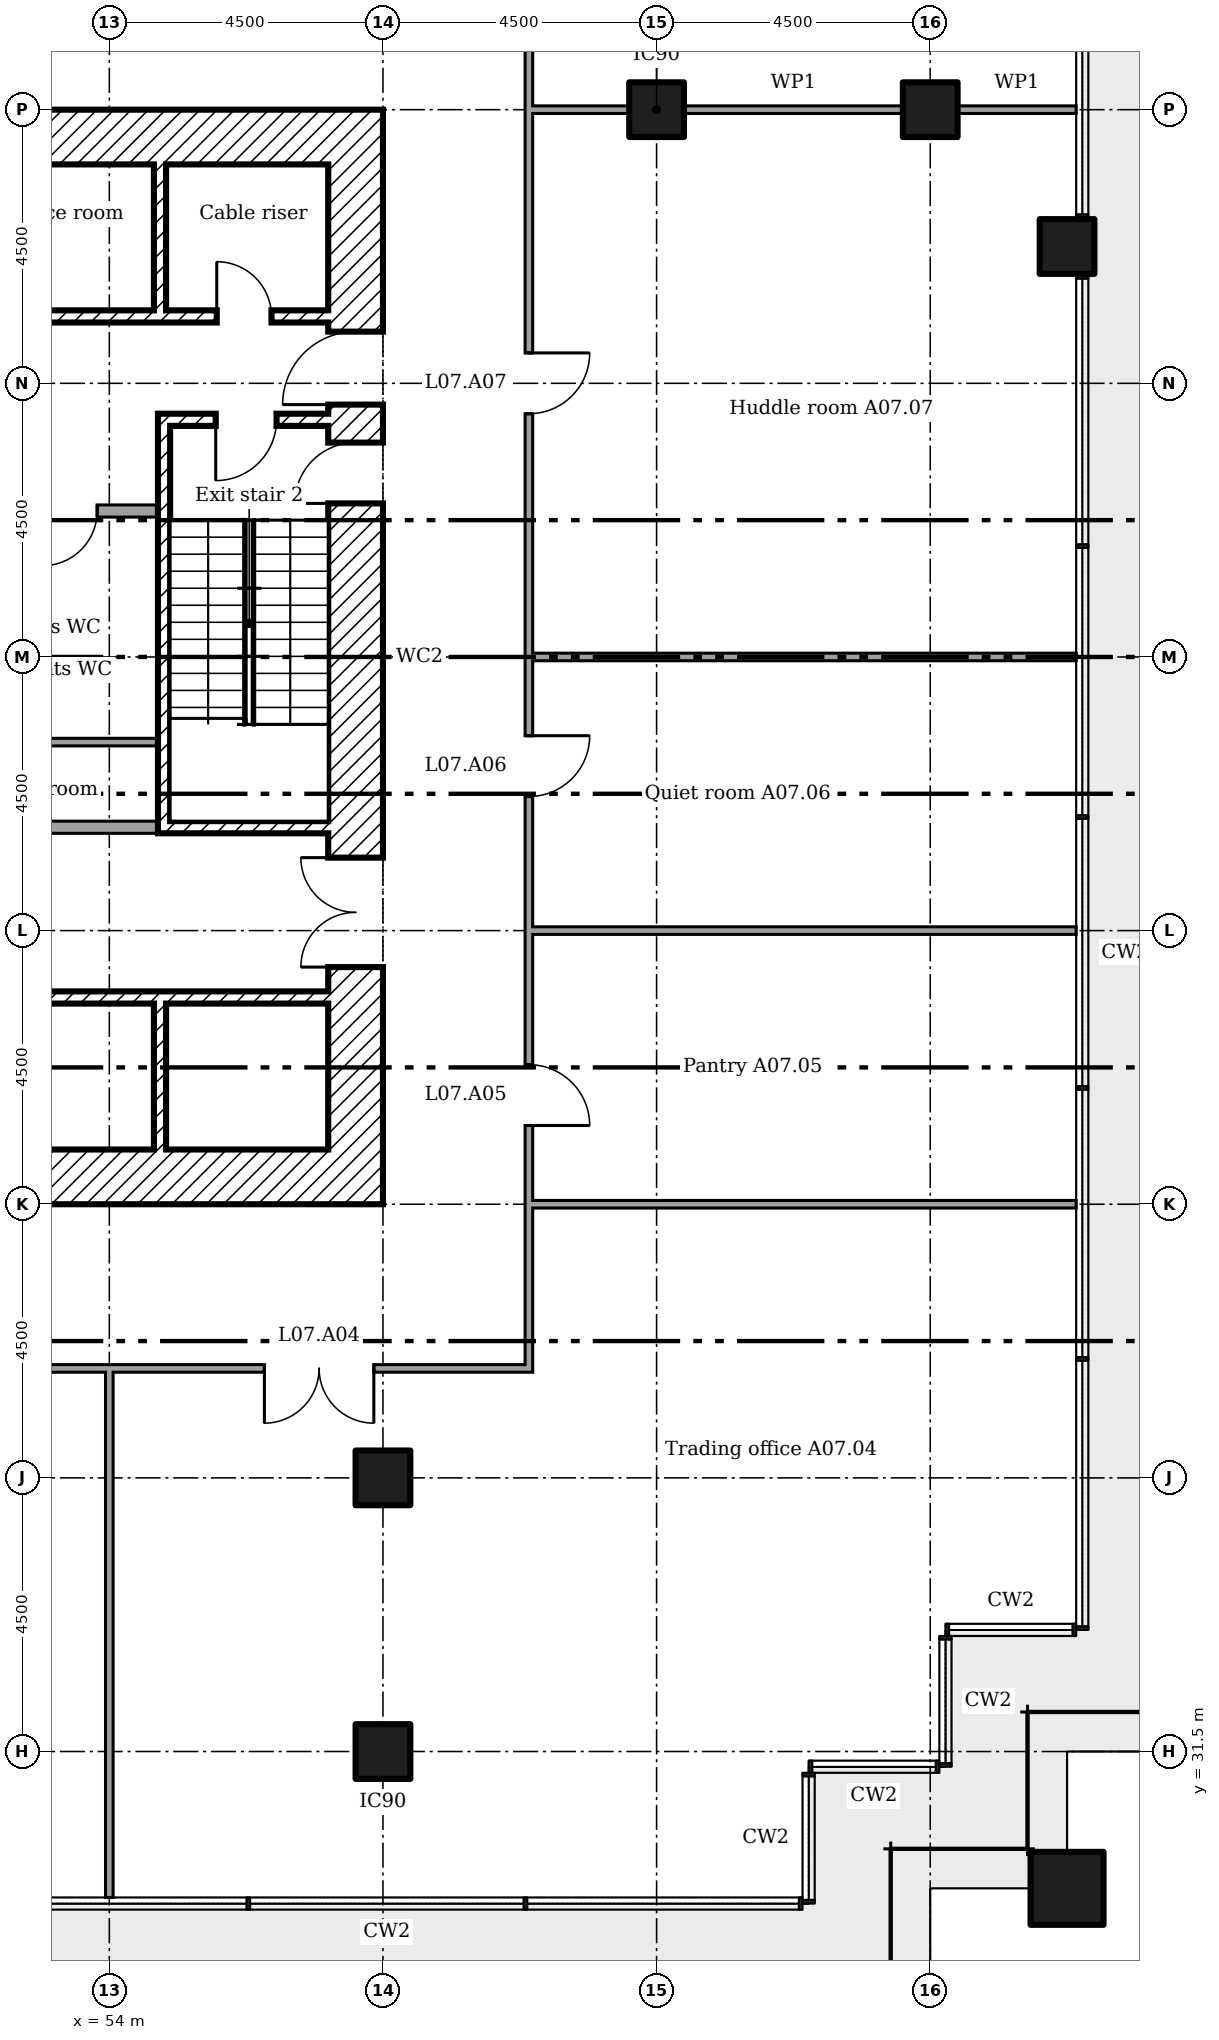
"""IFC4 building model, lengths in metres.
Left out: names, types, materials, properties, quantities, classifications, styles, units other than length and angle.
Written with IfcOpenShell. Run it as: python <this file> out.ifc"""

import sys

from ifc_helpers import new_model, si_unit, direction, frame, frame_2d, origin, origin_2d, place, context, subcontext, project, spatial, rectangle, extrude, element, fill, save


model = new_model("IFC4")
c1 = context("Model", 3, precision=1e-05, world=origin(), true_north=direction((0.0, 1.0)))
c2 = subcontext(c1, "Body", "Model", "MODEL_VIEW")
j1 = project(units=[si_unit("LENGTHUNIT", "METRE"), si_unit("PLANEANGLEUNIT", "RADIAN")], contexts=[c1])
p1 = place(None, origin())
s1 = spatial("IfcSite", under=j1, at=p1, CompositionType="ELEMENT")
p2 = place(p1, origin())
s2 = spatial("IfcBuilding", under=s1, at=p2, CompositionType="ELEMENT")
p3 = place(p2, frame((0.0, 0.0, 34.2)))
s3 = spatial("IfcBuildingStorey", under=s2, at=p3, CompositionType="ELEMENT", Elevation=34.2)
p4 = place(p3, frame((69.75, 29.25, 0.0)))
e1 = element("IfcColumn", 1, at=p4, inside=s3, PredefinedType="COLUMN", context=c2, shape_type="SweptSolid", body=[
    extrude(rectangle(XDim=1.2, YDim=1.2, at=origin_2d()), origin(), (0.0, 0.0, 1.0), 4.4),
])
for number, where in (
    (2, (58.5, 31.5, 0.0)),
    (3, (58.5, 36.0, 0.0)),
    (4, (63.0, 58.5, 0.0)),
    (5, (67.5, 58.5, 0.0)),
    (6, (69.75, 56.25, 0.0)),
):
    element("IfcColumn", number, at=place(p3, frame(where)), inside=s3, PredefinedType="COLUMN", context=c2, shape_type="SweptSolid", body=[
        extrude(rectangle(XDim=0.9, YDim=0.9, at=origin_2d()), origin(), (0.0, 0.0, 1.0), 4.4),
    ])
p5 = place(p3, frame((58.05, 40.5, 0.0), z_axis=(0.0, 0.0, 1.0), x_axis=(0.0, 1.0, 0.0)))
e7 = element("IfcWall", 7, at=p5, inside=s3, PredefinedType="SHEAR", context=c2, shape_type="SweptSolid", body=[
    extrude(rectangle(XDim=18.0, YDim=0.9, at=frame_2d((9.0, 0.0))), origin(), (0.0, 0.0, 1.0), 4.125),
])
p6 = place(p5, frame((13.15, 0.0, 0.0)))
e8 = element("IfcOpeningElement", 8, at=p6, cuts=e7, PredefinedType="OPENING", context=c2, shape_type="SweptSolid", body=[
    extrude(rectangle(XDim=1.2, YDim=2.1, at=frame_2d((0.6, 1.05))), frame((0.0, 0.46, 0.0), z_axis=(0.0, -1.0, 0.0), x_axis=(1.0, 0.0, 0.0)), (0.0, 0.0, 1.0), 0.92),
])
p7 = place(p5, frame((3.9, 0.0, 0.0)))
e9 = element("IfcOpeningElement", 9, at=p7, cuts=e7, PredefinedType="OPENING", context=c2, shape_type="SweptSolid", body=[
    extrude(rectangle(XDim=1.8, YDim=2.1, at=frame_2d((0.9, 1.05))), frame((0.0, 0.46, 0.0), z_axis=(0.0, -1.0, 0.0), x_axis=(1.0, 0.0, 0.0)), (0.0, 0.0, 1.0), 0.92),
])
p8 = place(p5, frame((11.525, 0.0, 0.0)))
e10 = element("IfcOpeningElement", 10, at=p8, cuts=e7, PredefinedType="OPENING", context=c2, shape_type="SweptSolid", body=[
    extrude(rectangle(XDim=1.0, YDim=2.1, at=frame_2d((0.5, 1.05))), frame((0.0, 0.46, 0.0), z_axis=(0.0, -1.0, 0.0), x_axis=(1.0, 0.0, 0.0)), (0.0, 0.0, 1.0), 0.92),
])
for number, where in (
    (11, (41.4, 58.05, 0.0)),
    (12, (41.4, 40.95, 0.0)),
):
    element("IfcWall", number, at=place(p3, frame(where)), inside=s3, PredefinedType="SHEAR", context=c2, shape_type="SweptSolid", body=[
        extrude(rectangle(XDim=16.2, YDim=0.9, at=frame_2d((8.1, 0.0))), origin(), (0.0, 0.0, 1.0), 4.125),
    ])
for number, where, z_axis, x_axis in (
    (13, (54.833, 57.6, 0.0), (0.0, 0.0, 1.0), (0.0, -1.0, 0.0)),
    (14, (54.833, 41.4, 0.0), (0.0, 0.0, 1.0), (0.0, 1.0, 0.0)),
):
    element("IfcWall", number, at=place(p3, frame(where, z_axis=z_axis, x_axis=x_axis)), inside=s3, PredefinedType="SHEAR", context=c2, shape_type="SweptSolid", body=[
        extrude(rectangle(XDim=2.4, YDim=0.2, at=frame_2d((1.2, 0.0))), origin(), (0.0, 0.0, 1.0), 4.125),
    ])
p9 = place(p3, frame((46.933, 55.1, 0.0)))
e15 = element("IfcWall", 15, at=p9, inside=s3, PredefinedType="SHEAR", context=c2, shape_type="SweptSolid", body=[
    extrude(rectangle(XDim=10.667, YDim=0.2, at=frame_2d((5.333, 0.0))), origin(), (0.0, 0.0, 1.0), 4.125),
])
p10 = place(p9, frame((8.833, 0.0, 0.0)))
e16 = element("IfcOpeningElement", 16, at=p10, cuts=e15, PredefinedType="OPENING", context=c2, shape_type="SweptSolid", body=[
    extrude(rectangle(XDim=0.9, YDim=2.1, at=frame_2d((0.45, 1.05))), frame((0.0, 0.11, 0.0), z_axis=(0.0, -1.0, 0.0), x_axis=(1.0, 0.0, 0.0)), (0.0, 0.0, 1.0), 0.22),
])
p11 = place(p9, frame((0.783, 0.0, 0.0)))
e17 = element("IfcOpeningElement", 17, at=p11, cuts=e15, PredefinedType="OPENING", context=c2, shape_type="SweptSolid", body=[
    extrude(rectangle(XDim=0.9, YDim=2.1, at=frame_2d((0.45, 1.05))), frame((0.0, 0.11, 0.0), z_axis=(0.0, -1.0, 0.0), x_axis=(1.0, 0.0, 0.0)), (0.0, 0.0, 1.0), 0.22),
])
p12 = place(p9, frame((4.783, 0.0, 0.0)))
e18 = element("IfcOpeningElement", 18, at=p12, cuts=e15, PredefinedType="OPENING", context=c2, shape_type="SweptSolid", body=[
    extrude(rectangle(XDim=0.9, YDim=2.1, at=frame_2d((0.45, 1.05))), frame((0.0, 0.11, 0.0), z_axis=(0.0, -1.0, 0.0), x_axis=(1.0, 0.0, 0.0)), (0.0, 0.0, 1.0), 0.22),
])
p13 = place(p3, frame((41.4, 43.9, 0.0)))
e19 = element("IfcWall", 19, at=p13, inside=s3, PredefinedType="SHEAR", context=c2, shape_type="SweptSolid", body=[
    extrude(rectangle(XDim=16.2, YDim=0.2, at=frame_2d((8.1, 0.0))), origin(), (0.0, 0.0, 1.0), 4.125),
])
p14 = place(p13, frame((0.833, 0.0, 0.0)))
e20 = element("IfcOpeningElement", 20, at=p14, cuts=e19, PredefinedType="OPENING", context=c2, shape_type="SweptSolid", body=[
    extrude(rectangle(XDim=1.2, YDim=2.1, at=frame_2d((0.6, 1.05))), frame((0.0, 0.11, 0.0), z_axis=(0.0, -1.0, 0.0), x_axis=(1.0, 0.0, 0.0)), (0.0, 0.0, 1.0), 0.22),
])
p15 = place(p13, frame((3.5, 0.0, 0.0)))
e21 = element("IfcOpeningElement", 21, at=p15, cuts=e19, PredefinedType="OPENING", context=c2, shape_type="SweptSolid", body=[
    extrude(rectangle(XDim=1.2, YDim=2.1, at=frame_2d((0.6, 1.05))), frame((0.0, 0.11, 0.0), z_axis=(0.0, -1.0, 0.0), x_axis=(1.0, 0.0, 0.0)), (0.0, 0.0, 1.0), 0.22),
])
p16 = place(p13, frame((6.167, 0.0, 0.0)))
e22 = element("IfcOpeningElement", 22, at=p16, cuts=e19, PredefinedType="OPENING", context=c2, shape_type="SweptSolid", body=[
    extrude(rectangle(XDim=1.2, YDim=2.1, at=frame_2d((0.6, 1.05))), frame((0.0, 0.11, 0.0), z_axis=(0.0, -1.0, 0.0), x_axis=(1.0, 0.0, 0.0)), (0.0, 0.0, 1.0), 0.22),
])
p17 = place(p13, frame((8.833, 0.0, 0.0)))
e23 = element("IfcOpeningElement", 23, at=p17, cuts=e19, PredefinedType="OPENING", context=c2, shape_type="SweptSolid", body=[
    extrude(rectangle(XDim=1.2, YDim=2.1, at=frame_2d((0.6, 1.05))), frame((0.0, 0.11, 0.0), z_axis=(0.0, -1.0, 0.0), x_axis=(1.0, 0.0, 0.0)), (0.0, 0.0, 1.0), 0.22),
])
p18 = place(p3, frame((54.8, 53.4, 0.0)))
e24 = element("IfcWall", 24, at=p18, inside=s3, PredefinedType="SHEAR", context=c2, shape_type="SweptSolid", body=[
    extrude(rectangle(XDim=2.8, YDim=0.2, at=frame_2d((1.4, 0.0))), origin(), (0.0, 0.0, 1.0), 4.125),
])
p19 = place(p18, frame((0.95, 0.0, 0.0)))
e25 = element("IfcOpeningElement", 25, at=p19, cuts=e24, PredefinedType="OPENING", context=c2, shape_type="SweptSolid", body=[
    extrude(rectangle(XDim=1.0, YDim=2.1, at=frame_2d((0.5, 1.05))), frame((0.0, 0.11, 0.0), z_axis=(0.0, -1.0, 0.0), x_axis=(1.0, 0.0, 0.0)), (0.0, 0.0, 1.0), 0.22),
])
p20 = place(p3, frame((54.8, 46.7, 0.0)))
e26 = element("IfcWall", 26, at=p20, inside=s3, PredefinedType="SHEAR", context=c2, shape_type="SweptSolid", body=[
    extrude(rectangle(XDim=2.8, YDim=0.2, at=frame_2d((1.4, 0.0))), origin(), (0.0, 0.0, 1.0), 4.125),
])
p21 = place(p3, frame((54.9, 46.8, 0.0), z_axis=(0.0, 0.0, 1.0), x_axis=(0.0, 1.0, 0.0)))
e27 = element("IfcWall", 27, at=p21, inside=s3, PredefinedType="SHEAR", context=c2, shape_type="SweptSolid", body=[
    extrude(rectangle(XDim=6.5, YDim=0.2, at=frame_2d((3.25, 0.0))), origin(), (0.0, 0.0, 1.0), 4.125),
])
p22 = place(p3, frame((44.2, 51.9, 0.0)))
e28 = element("IfcWall", 28, at=p22, inside=s3, PredefinedType="PARTITIONING", context=c2, shape_type="SweptSolid", body=[
    extrude(rectangle(XDim=10.6, YDim=0.2, at=frame_2d((5.3, 0.0))), origin(), (0.0, 0.0, 1.0), 4.125),
])
p23 = place(p22, frame((4.625, 0.0, 0.0)))
e29 = element("IfcOpeningElement", 29, at=p23, cuts=e28, PredefinedType="OPENING", context=c2, shape_type="SweptSolid", body=[
    extrude(rectangle(XDim=0.9, YDim=2.1, at=frame_2d((0.45, 1.05))), frame((0.0, 0.11, 0.0), z_axis=(0.0, -1.0, 0.0), x_axis=(1.0, 0.0, 0.0)), (0.0, 0.0, 1.0), 0.22),
])
p24 = place(p22, frame((6.25, 0.0, 0.0)))
e30 = element("IfcOpeningElement", 30, at=p24, cuts=e28, PredefinedType="OPENING", context=c2, shape_type="SweptSolid", body=[
    extrude(rectangle(XDim=0.9, YDim=2.1, at=frame_2d((0.45, 1.05))), frame((0.0, 0.11, 0.0), z_axis=(0.0, -1.0, 0.0), x_axis=(1.0, 0.0, 0.0)), (0.0, 0.0, 1.0), 0.22),
])
p25 = place(p22, frame((8.7, 0.0, 0.0)))
e31 = element("IfcOpeningElement", 31, at=p25, cuts=e28, PredefinedType="OPENING", context=c2, shape_type="SweptSolid", body=[
    extrude(rectangle(XDim=0.9, YDim=2.1, at=frame_2d((0.45, 1.05))), frame((0.0, 0.11, 0.0), z_axis=(0.0, -1.0, 0.0), x_axis=(1.0, 0.0, 0.0)), (0.0, 0.0, 1.0), 0.22),
])
p26 = place(p3, frame((44.2, 46.7, 0.0)))
e32 = element("IfcWall", 32, at=p26, inside=s3, PredefinedType="PARTITIONING", context=c2, shape_type="SweptSolid", body=[
    extrude(rectangle(XDim=10.6, YDim=0.2, at=frame_2d((5.3, 0.0))), origin(), (0.0, 0.0, 1.0), 4.125),
])
p27 = place(p26, frame((4.85, 0.0, 0.0)))
e33 = element("IfcOpeningElement", 33, at=p27, cuts=e32, PredefinedType="OPENING", context=c2, shape_type="SweptSolid", body=[
    extrude(rectangle(XDim=0.9, YDim=2.1, at=frame_2d((0.45, 1.05))), frame((0.0, 0.11, 0.0), z_axis=(0.0, -1.0, 0.0), x_axis=(1.0, 0.0, 0.0)), (0.0, 0.0, 1.0), 0.22),
])
p28 = place(p3, frame((54.8, 48.1, 0.0), z_axis=(0.0, 0.0, 1.0), x_axis=(-1.0, 0.0, 0.0)))
e34 = element("IfcWall", 34, at=p28, inside=s3, PredefinedType="PARTITIONING", context=c2, shape_type="SweptSolid", body=[
    extrude(rectangle(XDim=2.9, YDim=0.125, at=frame_2d((1.45, 0.0))), origin(), (0.0, 0.0, 1.0), 4.125),
])
p29 = place(p3, frame((38.038, 37.8, 0.0)))
e35 = element("IfcWall", 35, at=p29, inside=s3, PredefinedType="PARTITIONING", context=c2, shape_type="SweptSolid", body=[
    extrude(rectangle(XDim=22.925, YDim=0.125, at=frame_2d((11.462, 0.0))), origin(), (0.0, 0.0, 1.0), 4.225),
])
p30 = place(p29, frame((3.758, 0.0, 0.0)))
e36 = element("IfcOpeningElement", 36, at=p30, cuts=e35, PredefinedType="OPENING", context=c2, shape_type="SweptSolid", body=[
    extrude(rectangle(XDim=1.0, YDim=2.1, at=frame_2d((0.5, 1.05))), frame((0.0, 0.073, 0.0), z_axis=(0.0, -1.0, 0.0), x_axis=(1.0, 0.0, 0.0)), (0.0, 0.0, 1.0), 0.145),
])
p31 = place(p29, frame((12.205, 0.0, 0.0)))
e37 = element("IfcOpeningElement", 37, at=p31, cuts=e35, PredefinedType="OPENING", context=c2, shape_type="SweptSolid", body=[
    extrude(rectangle(XDim=1.0, YDim=2.1, at=frame_2d((0.5, 1.05))), frame((0.0, 0.073, 0.0), z_axis=(0.0, -1.0, 0.0), x_axis=(1.0, 0.0, 0.0)), (0.0, 0.0, 1.0), 0.145),
])
p32 = place(p29, frame((18.512, 0.0, 0.0)))
e38 = element("IfcOpeningElement", 38, at=p32, cuts=e35, PredefinedType="OPENING", context=c2, shape_type="SweptSolid", body=[
    extrude(rectangle(XDim=1.8, YDim=2.1, at=frame_2d((0.9, 1.05))), frame((0.0, 0.073, 0.0), z_axis=(0.0, -1.0, 0.0), x_axis=(1.0, 0.0, 0.0)), (0.0, 0.0, 1.0), 0.145),
])
for number, where in (
    (39, (60.9, 40.5, 0.0)),
    (40, (60.9, 45.0, 0.0)),
    (41, (60.9, 49.5, 0.0)),
):
    element("IfcWall", number, at=place(p3, frame(where)), inside=s3, PredefinedType="PARTITIONING", context=c2, shape_type="SweptSolid", body=[
        extrude(rectangle(XDim=9.0, YDim=0.125, at=frame_2d((4.5, 0.0))), origin(), (0.0, 0.0, 1.0), 3.467),
    ])
p33 = place(p3, frame((60.9, 58.5, 0.0)))
e42 = element("IfcWall", 42, at=p33, inside=s3, PredefinedType="PARTITIONING", context=c2, shape_type="SweptSolid", body=[
    extrude(rectangle(XDim=1.65, YDim=0.125, at=frame_2d((0.825, 0.0))), origin(), (0.0, 0.0, 1.0), 3.302),
])
p34 = place(p3, frame((63.45, 58.5, 0.0)))
e43 = element("IfcWall", 43, at=p34, inside=s3, PredefinedType="PARTITIONING", context=c2, shape_type="SweptSolid", body=[
    extrude(rectangle(XDim=3.6, YDim=0.125, at=frame_2d((1.8, 0.0))), origin(), (0.0, 0.0, 1.0), 3.302),
])
p35 = place(p3, frame((67.95, 58.5, 0.0)))
e44 = element("IfcWall", 44, at=p35, inside=s3, PredefinedType="PARTITIONING", context=c2, shape_type="SweptSolid", body=[
    extrude(rectangle(XDim=1.95, YDim=0.125, at=frame_2d((0.975, 0.0))), origin(), (0.0, 0.0, 1.0), 3.302),
])
p36 = place(p3, frame((54.0, 29.1, 0.0), z_axis=(0.0, 0.0, 1.0), x_axis=(0.0, 1.0, 0.0)))
e45 = element("IfcWall", 45, at=p36, inside=s3, PredefinedType="PARTITIONING", context=c2, shape_type="SweptSolid", body=[
    extrude(rectangle(XDim=8.7, YDim=0.125, at=frame_2d((4.35, 0.0))), origin(), (0.0, 0.0, 1.0), 3.467),
])
p37 = place(p3, frame((60.9, 37.863, 0.0), z_axis=(0.0, 0.0, 1.0), x_axis=(0.0, 1.0, 0.0)))
e46 = element("IfcWall", 46, at=p37, inside=s3, PredefinedType="PARTITIONING", context=c2, shape_type="SweptSolid", body=[
    extrude(rectangle(XDim=22.975, YDim=0.125, at=frame_2d((11.487, 0.0))), origin(), (0.0, 0.0, 1.0), 4.225),
])
p38 = place(p37, frame((3.933, 0.0, 0.0)))
e47 = element("IfcOpeningElement", 47, at=p38, cuts=e46, PredefinedType="OPENING", context=c2, shape_type="SweptSolid", body=[
    extrude(rectangle(XDim=1.0, YDim=2.1, at=frame_2d((0.5, 1.05))), frame((0.0, 0.073, 0.0), z_axis=(0.0, -1.0, 0.0), x_axis=(1.0, 0.0, 0.0)), (0.0, 0.0, 1.0), 0.145),
])
p39 = place(p37, frame((9.343, 0.0, 0.0)))
e48 = element("IfcOpeningElement", 48, at=p39, cuts=e46, PredefinedType="OPENING", context=c2, shape_type="SweptSolid", body=[
    extrude(rectangle(XDim=1.0, YDim=2.1, at=frame_2d((0.5, 1.05))), frame((0.0, 0.073, 0.0), z_axis=(0.0, -1.0, 0.0), x_axis=(1.0, 0.0, 0.0)), (0.0, 0.0, 1.0), 0.145),
])
p40 = place(p37, frame((15.637, 0.0, 0.0)))
e49 = element("IfcOpeningElement", 49, at=p40, cuts=e46, PredefinedType="OPENING", context=c2, shape_type="SweptSolid", body=[
    extrude(rectangle(XDim=1.0, YDim=2.1, at=frame_2d((0.5, 1.05))), frame((0.0, 0.073, 0.0), z_axis=(0.0, -1.0, 0.0), x_axis=(1.0, 0.0, 0.0)), (0.0, 0.0, 1.0), 0.145),
])
p41 = place(p6, origin())
e50 = element("IfcDoor", 50, at=p41, inside=s3, OperationType="SINGLE_SWING_RIGHT", PredefinedType="DOOR", context=c2, shape_type="SweptSolid", body=[
    extrude(rectangle(XDim=1.2, YDim=2.1, at=frame_2d((0.6, 1.05))), frame((0.0, 0.025, 0.0), z_axis=(0.0, -1.0, 0.0), x_axis=(1.0, 0.0, 0.0)), (0.0, 0.0, 1.0), 0.05),
])
fill(e8, e50)
p42 = place(p7, origin())
e51 = element("IfcDoor", 51, at=p42, inside=s3, OperationType="DOUBLE_DOOR_SINGLE_SWING", PredefinedType="DOOR", context=c2, shape_type="SweptSolid", body=[
    extrude(rectangle(XDim=1.8, YDim=2.1, at=frame_2d((0.9, 1.05))), frame((0.0, 0.025, 0.0), z_axis=(0.0, -1.0, 0.0), x_axis=(1.0, 0.0, 0.0)), (0.0, 0.0, 1.0), 0.05),
])
fill(e9, e51)
p43 = place(p19, frame((1.0, 0.0, 0.0), x_axis=(-1.0, 0.0, 0.0)))
e52 = element("IfcDoor", 52, at=p43, inside=s3, OperationType="SINGLE_SWING_LEFT", PredefinedType="DOOR", context=c2, shape_type="SweptSolid", body=[
    extrude(rectangle(XDim=1.0, YDim=2.1, at=frame_2d((0.5, 1.05))), frame((0.0, 0.025, 0.0), z_axis=(0.0, -1.0, 0.0), x_axis=(1.0, 0.0, 0.0)), (0.0, 0.0, 1.0), 0.05),
])
fill(e25, e52)
p44 = place(p8, origin())
e53 = element("IfcDoor", 53, at=p44, inside=s3, OperationType="SINGLE_SWING_RIGHT", PredefinedType="DOOR", context=c2, shape_type="SweptSolid", body=[
    extrude(rectangle(XDim=1.0, YDim=2.1, at=frame_2d((0.5, 1.05))), frame((0.0, 0.025, 0.0), z_axis=(0.0, -1.0, 0.0), x_axis=(1.0, 0.0, 0.0)), (0.0, 0.0, 1.0), 0.05),
])
fill(e10, e53)
p45 = place(p10, origin())
e54 = element("IfcDoor", 54, at=p45, inside=s3, OperationType="SINGLE_SWING_RIGHT", PredefinedType="DOOR", context=c2, shape_type="SweptSolid", body=[
    extrude(rectangle(XDim=0.9, YDim=2.1, at=frame_2d((0.45, 1.05))), frame((0.0, 0.025, 0.0), z_axis=(0.0, -1.0, 0.0), x_axis=(1.0, 0.0, 0.0)), (0.0, 0.0, 1.0), 0.05),
])
fill(e16, e54)
p46 = place(p25, frame((0.9, 0.0, 0.0), x_axis=(-1.0, 0.0, 0.0)))
e55 = element("IfcDoor", 55, at=p46, inside=s3, OperationType="SINGLE_SWING_LEFT", PredefinedType="DOOR", context=c2, shape_type="SweptSolid", body=[
    extrude(rectangle(XDim=0.9, YDim=2.1, at=frame_2d((0.45, 1.05))), frame((0.0, 0.025, 0.0), z_axis=(0.0, -1.0, 0.0), x_axis=(1.0, 0.0, 0.0)), (0.0, 0.0, 1.0), 0.05),
])
fill(e31, e55)
p47 = place(p32, frame((1.8, 0.0, 0.0), x_axis=(-1.0, 0.0, 0.0)))
e56 = element("IfcDoor", 56, at=p47, inside=s3, OperationType="DOUBLE_DOOR_SINGLE_SWING", PredefinedType="DOOR", context=c2, shape_type="SweptSolid", body=[
    extrude(rectangle(XDim=1.8, YDim=2.1, at=frame_2d((0.9, 1.05))), frame((0.0, 0.025, 0.0), z_axis=(0.0, -1.0, 0.0), x_axis=(1.0, 0.0, 0.0)), (0.0, 0.0, 1.0), 0.05),
])
fill(e38, e56)
p48 = place(p38, frame((1.0, 0.0, 0.0), x_axis=(-1.0, 0.0, 0.0)))
e57 = element("IfcDoor", 57, at=p48, inside=s3, OperationType="SINGLE_SWING_LEFT", PredefinedType="DOOR", context=c2, shape_type="SweptSolid", body=[
    extrude(rectangle(XDim=1.0, YDim=2.1, at=frame_2d((0.5, 1.05))), frame((0.0, 0.025, 0.0), z_axis=(0.0, -1.0, 0.0), x_axis=(1.0, 0.0, 0.0)), (0.0, 0.0, 1.0), 0.05),
])
fill(e47, e57)
p49 = place(p39, frame((1.0, 0.0, 0.0), x_axis=(-1.0, 0.0, 0.0)))
e58 = element("IfcDoor", 58, at=p49, inside=s3, OperationType="SINGLE_SWING_RIGHT", PredefinedType="DOOR", context=c2, shape_type="SweptSolid", body=[
    extrude(rectangle(XDim=1.0, YDim=2.1, at=frame_2d((0.5, 1.05))), frame((0.0, 0.025, 0.0), z_axis=(0.0, -1.0, 0.0), x_axis=(1.0, 0.0, 0.0)), (0.0, 0.0, 1.0), 0.05),
])
fill(e48, e58)
p50 = place(p40, frame((1.0, 0.0, 0.0), x_axis=(-1.0, 0.0, 0.0)))
e59 = element("IfcDoor", 59, at=p50, inside=s3, OperationType="SINGLE_SWING_RIGHT", PredefinedType="DOOR", context=c2, shape_type="SweptSolid", body=[
    extrude(rectangle(XDim=1.0, YDim=2.1, at=frame_2d((0.5, 1.05))), frame((0.0, 0.025, 0.0), z_axis=(0.0, -1.0, 0.0), x_axis=(1.0, 0.0, 0.0)), (0.0, 0.0, 1.0), 0.05),
])
fill(e49, e59)
save(model, sys.argv[1])
